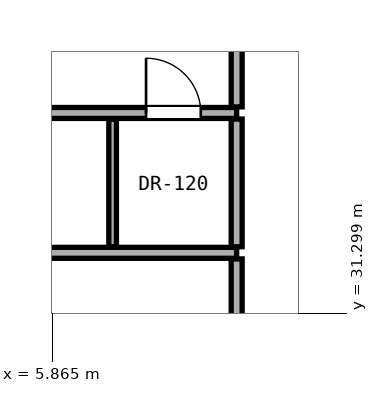
"""IFC4 building model, lengths in metres.
Left out: names, types, materials, properties, quantities, classifications, styles, units other than length and angle.
Written with IfcOpenShell. Run it as: python <this file> out.ifc"""

import sys

from ifc_helpers import new_model, si_unit, direction, frame, frame_2d, origin, place, context, subcontext, project, spatial, rectangle, extrude, element, fill, save


model = new_model("IFC4")
c1 = context("Model", 3, precision=1e-05, world=origin(), true_north=direction((0.0, 1.0)))
c2 = subcontext(c1, "Body", "Model", "MODEL_VIEW")
j1 = project(units=[si_unit("LENGTHUNIT", "METRE"), si_unit("PLANEANGLEUNIT", "RADIAN")], contexts=[c1])
p1 = place(None, origin())
s1 = spatial("IfcSite", under=j1, at=p1, CompositionType="ELEMENT")
p2 = place(p1, origin())
s2 = spatial("IfcBuilding", under=s1, at=p2, CompositionType="ELEMENT")
p3 = place(p2, frame((0.0, 0.0, 111.5)))
s3 = spatial("IfcBuildingStorey", under=s2, at=p3, CompositionType="ELEMENT", Elevation=111.5)
p4 = place(p3, frame((-1.69, 32.295, 0.0), z_axis=(0.0, 0.0, 1.0), x_axis=(1.0, 0.0, 0.0)))
e1 = element("IfcWall", 1, at=p4, inside=s3, PredefinedType="PARTITIONING", context=c2, shape_type="SweptSolid", body=[
    extrude(rectangle(XDim=10.59, YDim=0.18, at=frame_2d((5.295, 0.0))), origin(), (0.0, 0.0, 1.0), 2.145),
])
p5 = place(p3, frame((-1.69, 34.595, 0.0), z_axis=(0.0, 0.0, 1.0), x_axis=(1.0, 0.0, 0.0)))
e2 = element("IfcWall", 2, at=p5, inside=s3, PredefinedType="PARTITIONING", context=c2, shape_type="SweptSolid", body=[
    extrude(rectangle(XDim=10.59, YDim=0.18, at=frame_2d((5.295, 0.0))), origin(), (0.0, 0.0, 1.0), 2.145),
])
p6 = place(p5, frame((3.87, 0.0, 0.0)))
e3 = element("IfcOpeningElement", 3, at=p6, cuts=e2, PredefinedType="OPENING", context=c2, shape_type="SweptSolid", body=[
    extrude(rectangle(XDim=0.85, YDim=2.01, at=frame_2d((0.425, 1.005))), frame((0.0, 0.1, 0.0), z_axis=(0.0, -1.0, 0.0), x_axis=(1.0, 0.0, 0.0)), (0.0, 0.0, 1.0), 0.2),
])
p7 = place(p5, frame((9.1, 0.0, 0.0)))
e4 = element("IfcOpeningElement", 4, at=p7, cuts=e2, PredefinedType="OPENING", context=c2, shape_type="SweptSolid", body=[
    extrude(rectangle(XDim=0.9, YDim=2.1, at=frame_2d((0.45, 1.05))), frame((0.0, 0.1, 0.0), z_axis=(0.0, -1.0, 0.0), x_axis=(1.0, 0.0, 0.0)), (0.0, 0.0, 1.0), 0.2),
])
p8 = place(p3, frame((6.86, 32.395, 0.0), z_axis=(0.0, 0.0, 1.0), x_axis=(0.0, 1.0, 0.0)))
e5 = element("IfcWall", 5, at=p8, inside=s3, PredefinedType="PARTITIONING", context=c2, shape_type="SweptSolid", body=[
    extrude(rectangle(XDim=2.1, YDim=0.125, at=frame_2d((1.05, 0.0))), origin(), (0.0, 0.0, 1.0), 3.08),
])
p9 = place(p3, frame((8.9, 27.2, 0.0), z_axis=(0.0, 0.0, 1.0), x_axis=(0.0, 1.0, 0.0)))
e6 = element("IfcWall", 6, at=p9, inside=s3, PredefinedType="PARTITIONING", context=c2, shape_type="SweptSolid", body=[
    extrude(rectangle(XDim=4.995, YDim=0.18, at=frame_2d((2.498, 0.0))), origin(), (0.0, 0.0, 1.0), 2.299),
])
p10 = place(p9, frame((1.972, 0.0, 0.0)))
e7 = element("IfcOpeningElement", 7, at=p10, cuts=e6, PredefinedType="OPENING", context=c2, shape_type="SweptSolid", body=[
    extrude(rectangle(XDim=1.05, YDim=2.2, at=frame_2d((0.525, 1.1))), frame((0.0, 0.1, 0.0), z_axis=(0.0, -1.0, 0.0), x_axis=(1.0, 0.0, 0.0)), (0.0, 0.0, 1.0), 0.2),
])
p11 = place(p3, frame((8.9, 32.395, 0.0), z_axis=(0.0, 0.0, 1.0), x_axis=(0.0, 1.0, 0.0)))
e8 = element("IfcWall", 8, at=p11, inside=s3, PredefinedType="PARTITIONING", context=c2, shape_type="SweptSolid", body=[
    extrude(rectangle(XDim=2.1, YDim=0.18, at=frame_2d((1.05, 0.0))), origin(), (0.0, 0.0, 1.0), 3.08),
])
p12 = place(p3, frame((8.9, 34.695, 0.0), z_axis=(0.0, 0.0, 1.0), x_axis=(0.0, 1.0, 0.0)))
e9 = element("IfcWall", 9, at=p12, inside=s3, PredefinedType="PARTITIONING", context=c2, shape_type="SweptSolid", body=[
    extrude(rectangle(XDim=7.116, YDim=0.18, at=frame_2d((3.558, 0.0))), origin(), (0.0, 0.0, 1.0), 2.456),
])
p13 = place(p12, frame((3.033, 0.0, 0.0)))
e10 = element("IfcOpeningElement", 10, at=p13, cuts=e9, PredefinedType="OPENING", context=c2, shape_type="SweptSolid", body=[
    extrude(rectangle(XDim=1.05, YDim=2.2, at=frame_2d((0.525, 1.1))), frame((0.0, 0.1, 0.0), z_axis=(0.0, -1.0, 0.0), x_axis=(1.0, 0.0, 0.0)), (0.0, 0.0, 1.0), 0.2),
])
p14 = place(p7, origin())
e11 = element("IfcDoor", 11, at=p14, inside=s3, OperationType="SINGLE_SWING_LEFT", PredefinedType="DOOR", context=c2, shape_type="SweptSolid", body=[
    extrude(rectangle(XDim=0.9, YDim=2.1, at=frame_2d((0.45, 1.05))), frame((0.0, 0.025, 0.0), z_axis=(0.0, -1.0, 0.0), x_axis=(1.0, 0.0, 0.0)), (0.0, 0.0, 1.0), 0.05),
])
fill(e4, e11)
save(model, sys.argv[1])
